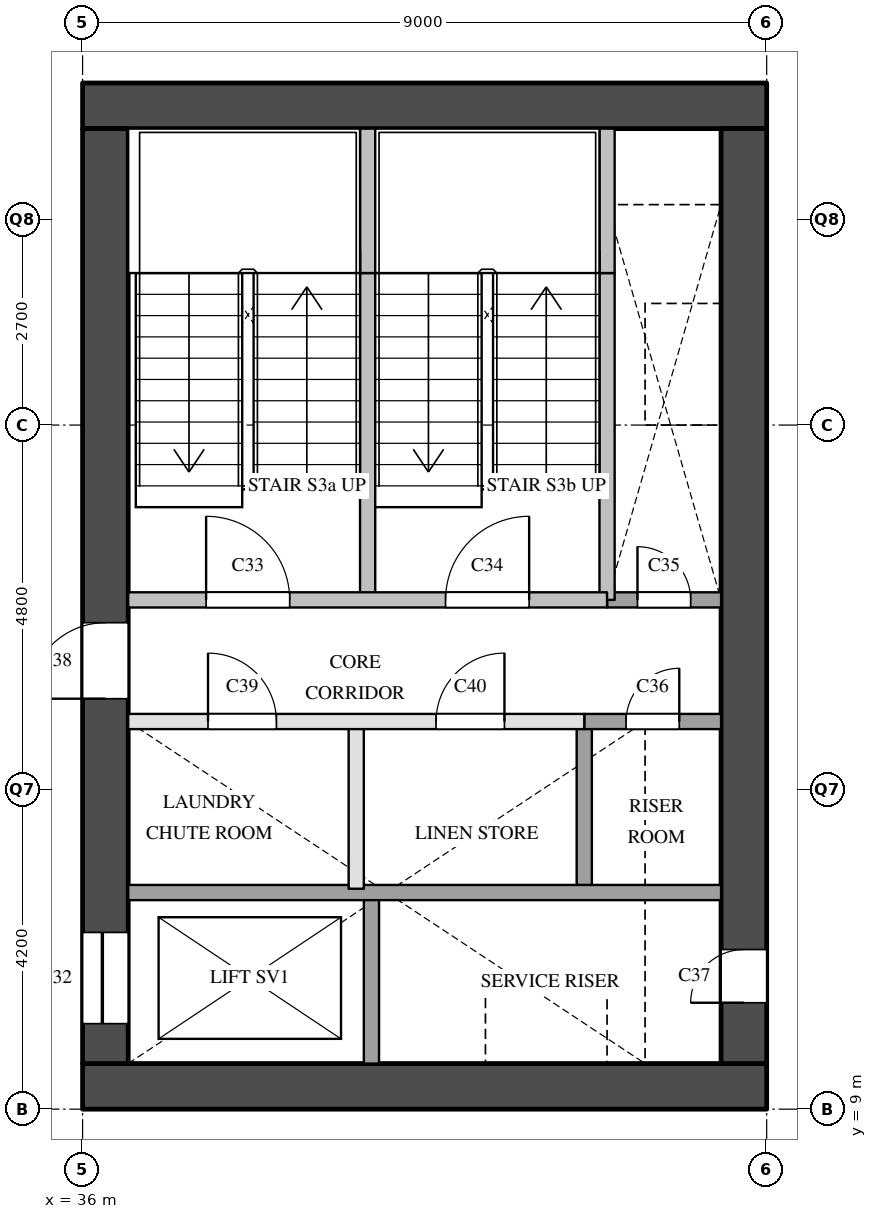
"""IFC4 building model, lengths in metres.
Left out: names, types, materials, properties, quantities, classifications, styles, units other than length and angle.
Written with IfcOpenShell. Run it as: python <this file> out.ifc"""

import sys

from ifc_helpers import new_model, si_unit, direction, frame, frame_2d, origin, place, context, subcontext, project, spatial, rectangle, extrude, element, fill, save


model = new_model("IFC4")
c1 = context("Model", 3, precision=1e-05, world=origin(), true_north=direction((0.0, 1.0)))
c2 = subcontext(c1, "Body", "Model", "MODEL_VIEW")
j1 = project(units=[si_unit("LENGTHUNIT", "METRE"), si_unit("PLANEANGLEUNIT", "RADIAN")], contexts=[c1])
p1 = place(None, origin())
s1 = spatial("IfcSite", under=j1, at=p1, CompositionType="ELEMENT")
p2 = place(p1, origin())
s2 = spatial("IfcBuilding", under=s1, at=p2, CompositionType="ELEMENT")
p3 = place(p2, frame((0.0, 0.0, 65.2)))
s3 = spatial("IfcBuildingStorey", under=s2, at=p3, CompositionType="ELEMENT", Elevation=65.2)
for number, where, z_axis, x_axis in (
    (1, (36.0, 9.3, 0.0), (0.0, 0.0, 1.0), (1.0, 0.0, 0.0)),
    (2, (36.0, 22.2, 0.0), (0.0, 0.0, 1.0), (1.0, 0.0, 0.0)),
):
    element("IfcWall", number, at=place(p3, frame(where, z_axis=z_axis, x_axis=x_axis)), inside=s3, PredefinedType="SHEAR", context=c2, shape_type="SweptSolid", body=[
        extrude(rectangle(XDim=9.0, YDim=0.6, at=frame_2d((4.5, 0.0))), origin(), (0.0, 0.0, 1.0), 3.5),
    ])
p4 = place(p3, frame((36.3, 9.6, 0.0), z_axis=(0.0, 0.0, 1.0), x_axis=(0.0, 1.0, 0.0)))
e3 = element("IfcWall", 3, at=p4, inside=s3, PredefinedType="SHEAR", context=c2, shape_type="SweptSolid", body=[
    extrude(rectangle(XDim=12.3, YDim=0.6, at=frame_2d((6.15, 0.0))), origin(), (0.0, 0.0, 1.0), 3.5),
])
p5 = place(p4, frame((0.525, 0.0, 0.0)))
e4 = element("IfcOpeningElement", 4, at=p5, cuts=e3, PredefinedType="OPENING", context=c2, shape_type="SweptSolid", body=[
    extrude(rectangle(XDim=1.2, YDim=2.1, at=frame_2d((0.6, 1.05))), frame((0.0, 0.31, 0.0), z_axis=(0.0, -1.0, 0.0), x_axis=(1.0, 0.0, 0.0)), (0.0, 0.0, 1.0), 0.62),
])
p6 = place(p4, frame((4.8, 0.0, 0.0)))
e5 = element("IfcOpeningElement", 5, at=p6, cuts=e3, PredefinedType="OPENING", context=c2, shape_type="SweptSolid", body=[
    extrude(rectangle(XDim=1.0, YDim=2.1, at=frame_2d((0.5, 1.05))), frame((0.0, 0.31, 0.0), z_axis=(0.0, -1.0, 0.0), x_axis=(1.0, 0.0, 0.0)), (0.0, 0.0, 1.0), 0.62),
])
p7 = place(p3, frame((44.7, 9.6, 0.0), z_axis=(0.0, 0.0, 1.0), x_axis=(0.0, 1.0, 0.0)))
e6 = element("IfcWall", 6, at=p7, inside=s3, PredefinedType="SHEAR", context=c2, shape_type="SweptSolid", body=[
    extrude(rectangle(XDim=12.3, YDim=0.6, at=frame_2d((6.15, 0.0))), origin(), (0.0, 0.0, 1.0), 3.5),
])
p8 = place(p7, frame((0.8, 0.0, 0.0)))
e7 = element("IfcOpeningElement", 7, at=p8, cuts=e6, PredefinedType="OPENING", context=c2, shape_type="SweptSolid", body=[
    extrude(rectangle(XDim=0.7, YDim=2.1, at=frame_2d((0.35, 1.05))), frame((0.0, 0.31, 0.0), z_axis=(0.0, -1.0, 0.0), x_axis=(1.0, 0.0, 0.0)), (0.0, 0.0, 1.0), 0.62),
])
p9 = place(p3, frame((39.6, 11.9, 0.0), z_axis=(0.0, 0.0, 1.0), x_axis=(0.0, 1.0, 0.0)))
e8 = element("IfcWall", 8, at=p9, inside=s3, PredefinedType="PARTITIONING", context=c2, shape_type="SweptSolid", body=[
    extrude(rectangle(XDim=2.2, YDim=0.2, at=frame_2d((1.1, 0.0))), origin(), (0.0, 0.0, 1.0), 3.5),
])
p10 = place(p3, frame((39.75, 15.7, 0.0), z_axis=(0.0, 0.0, 1.0), x_axis=(0.0, 1.0, 0.0)))
e9 = element("IfcWall", 9, at=p10, inside=s3, PredefinedType="SOLIDWALL", context=c2, shape_type="SweptSolid", body=[
    extrude(rectangle(XDim=4.3, YDim=0.2, at=frame_2d((2.15, 0.0))), origin(), (0.0, 0.0, 1.0), 3.5),
])
p11 = place(p3, frame((39.75, 20.0, 0.0), z_axis=(0.0, 0.0, 1.0), x_axis=(0.0, 1.0, 0.0)))
e10 = element("IfcWall", 10, at=p11, inside=s3, PredefinedType="SOLIDWALL", context=c2, shape_type="SweptSolid", body=[
    extrude(rectangle(XDim=1.9, YDim=0.2, at=frame_2d((0.95, 0.0))), origin(), (0.0, 0.0, 1.0), 3.5),
])
p12 = place(p3, frame((39.8, 9.6, 0.0), z_axis=(0.0, 0.0, 1.0), x_axis=(0.0, 1.0, 0.0)))
e11 = element("IfcWall", 11, at=p12, inside=s3, PredefinedType="SOLIDWALL", context=c2, shape_type="SweptSolid", body=[
    extrude(rectangle(XDim=2.3, YDim=0.2, at=frame_2d((1.15, 0.0))), origin(), (0.0, 0.0, 1.0), 3.5),
])
p13 = place(p3, frame((42.6, 11.9, 0.0), z_axis=(0.0, 0.0, 1.0), x_axis=(0.0, 1.0, 0.0)))
e12 = element("IfcWall", 12, at=p13, inside=s3, PredefinedType="SOLIDWALL", context=c2, shape_type="SweptSolid", body=[
    extrude(rectangle(XDim=2.2, YDim=0.2, at=frame_2d((1.1, 0.0))), origin(), (0.0, 0.0, 1.0), 3.5),
])
p14 = place(p3, frame((42.9, 15.7, 0.0), z_axis=(0.0, 0.0, 1.0), x_axis=(0.0, 1.0, 0.0)))
e13 = element("IfcWall", 13, at=p14, inside=s3, PredefinedType="SOLIDWALL", context=c2, shape_type="SweptSolid", body=[
    extrude(rectangle(XDim=4.3, YDim=0.2, at=frame_2d((2.15, 0.0))), origin(), (0.0, 0.0, 1.0), 3.5),
])
p15 = place(p3, frame((42.9, 20.0, 0.0), z_axis=(0.0, 0.0, 1.0), x_axis=(0.0, 1.0, 0.0)))
e14 = element("IfcWall", 14, at=p15, inside=s3, PredefinedType="SOLIDWALL", context=c2, shape_type="SweptSolid", body=[
    extrude(rectangle(XDim=1.9, YDim=0.2, at=frame_2d((0.95, 0.0))), origin(), (0.0, 0.0, 1.0), 3.5),
])
p16 = place(p3, frame((36.6, 11.85, 0.0), z_axis=(0.0, 0.0, 1.0), x_axis=(1.0, 0.0, 0.0)))
e15 = element("IfcWall", 15, at=p16, inside=s3, PredefinedType="SOLIDWALL", context=c2, shape_type="SweptSolid", body=[
    extrude(rectangle(XDim=7.8, YDim=0.2, at=frame_2d((3.9, 0.0))), origin(), (0.0, 0.0, 1.0), 3.5),
])
p17 = place(p3, frame((36.6, 14.1, 0.0), z_axis=(0.0, 0.0, 1.0), x_axis=(1.0, 0.0, 0.0)))
e16 = element("IfcWall", 16, at=p17, inside=s3, PredefinedType="PARTITIONING", context=c2, shape_type="SweptSolid", body=[
    extrude(rectangle(XDim=6.0, YDim=0.2, at=frame_2d((3.0, 0.0))), origin(), (0.0, 0.0, 1.0), 3.5),
])
p18 = place(p17, frame((1.05, 0.0, 0.0)))
e17 = element("IfcOpeningElement", 17, at=p18, cuts=e16, PredefinedType="OPENING", context=c2, shape_type="SweptSolid", body=[
    extrude(rectangle(XDim=0.9, YDim=2.1, at=frame_2d((0.45, 1.05))), frame((0.0, 0.11, 0.0), z_axis=(0.0, -1.0, 0.0), x_axis=(1.0, 0.0, 0.0)), (0.0, 0.0, 1.0), 0.22),
])
p19 = place(p17, frame((4.05, 0.0, 0.0)))
e18 = element("IfcOpeningElement", 18, at=p19, cuts=e16, PredefinedType="OPENING", context=c2, shape_type="SweptSolid", body=[
    extrude(rectangle(XDim=0.9, YDim=2.1, at=frame_2d((0.45, 1.05))), frame((0.0, 0.11, 0.0), z_axis=(0.0, -1.0, 0.0), x_axis=(1.0, 0.0, 0.0)), (0.0, 0.0, 1.0), 0.22),
])
p20 = place(p3, frame((42.6, 14.1, 0.0), z_axis=(0.0, 0.0, 1.0), x_axis=(1.0, 0.0, 0.0)))
e19 = element("IfcWall", 19, at=p20, inside=s3, PredefinedType="SOLIDWALL", context=c2, shape_type="SweptSolid", body=[
    extrude(rectangle(XDim=1.8, YDim=0.2, at=frame_2d((0.9, 0.0))), origin(), (0.0, 0.0, 1.0), 3.5),
])
p21 = place(p20, frame((0.55, 0.0, 0.0)))
e20 = element("IfcOpeningElement", 20, at=p21, cuts=e19, PredefinedType="OPENING", context=c2, shape_type="SweptSolid", body=[
    extrude(rectangle(XDim=0.7, YDim=2.1, at=frame_2d((0.35, 1.05))), frame((0.0, 0.11, 0.0), z_axis=(0.0, -1.0, 0.0), x_axis=(1.0, 0.0, 0.0)), (0.0, 0.0, 1.0), 0.22),
])
p22 = place(p3, frame((42.9, 15.7, 0.0), z_axis=(0.0, 0.0, 1.0), x_axis=(1.0, 0.0, 0.0)))
e21 = element("IfcWall", 21, at=p22, inside=s3, PredefinedType="SOLIDWALL", context=c2, shape_type="SweptSolid", body=[
    extrude(rectangle(XDim=1.5, YDim=0.2, at=frame_2d((0.75, 0.0))), origin(), (0.0, 0.0, 1.0), 3.5),
])
p23 = place(p22, frame((0.4, 0.0, 0.0)))
e22 = element("IfcOpeningElement", 22, at=p23, cuts=e21, PredefinedType="OPENING", context=c2, shape_type="SweptSolid", body=[
    extrude(rectangle(XDim=0.7, YDim=2.1, at=frame_2d((0.35, 1.05))), frame((0.0, 0.11, 0.0), z_axis=(0.0, -1.0, 0.0), x_axis=(1.0, 0.0, 0.0)), (0.0, 0.0, 1.0), 0.22),
])
p24 = place(p3, frame((36.6, 15.7, 0.0), z_axis=(0.0, 0.0, 1.0), x_axis=(1.0, 0.0, 0.0)))
e23 = element("IfcWall", 23, at=p24, inside=s3, PredefinedType="SOLIDWALL", context=c2, shape_type="SweptSolid", body=[
    extrude(rectangle(XDim=6.3, YDim=0.2, at=frame_2d((3.15, 0.0))), origin(), (0.0, 0.0, 1.0), 3.5),
])
p25 = place(p24, frame((1.025, 0.0, 0.0)))
e24 = element("IfcOpeningElement", 24, at=p25, cuts=e23, PredefinedType="OPENING", context=c2, shape_type="SweptSolid", body=[
    extrude(rectangle(XDim=1.1, YDim=2.1, at=frame_2d((0.55, 1.05))), frame((0.0, 0.11, 0.0), z_axis=(0.0, -1.0, 0.0), x_axis=(1.0, 0.0, 0.0)), (0.0, 0.0, 1.0), 0.22),
])
p26 = place(p24, frame((4.175, 0.0, 0.0)))
e25 = element("IfcOpeningElement", 25, at=p26, cuts=e23, PredefinedType="OPENING", context=c2, shape_type="SweptSolid", body=[
    extrude(rectangle(XDim=1.1, YDim=2.1, at=frame_2d((0.55, 1.05))), frame((0.0, 0.11, 0.0), z_axis=(0.0, -1.0, 0.0), x_axis=(1.0, 0.0, 0.0)), (0.0, 0.0, 1.0), 0.22),
])
p27 = place(p5, origin())
e26 = element("IfcDoor", 26, at=p27, inside=s3, OperationType="SLIDING_TO_LEFT", PredefinedType="DOOR", context=c2, shape_type="SweptSolid", body=[
    extrude(rectangle(XDim=1.2, YDim=2.1, at=frame_2d((0.6, 1.05))), frame((0.0, 0.025, 0.0), z_axis=(0.0, -1.0, 0.0), x_axis=(1.0, 0.0, 0.0)), (0.0, 0.0, 1.0), 0.05),
])
fill(e4, e26)
p28 = place(p25, origin())
e27 = element("IfcDoor", 27, at=p28, inside=s3, OperationType="SINGLE_SWING_LEFT", PredefinedType="DOOR", context=c2, shape_type="SweptSolid", body=[
    extrude(rectangle(XDim=1.1, YDim=2.1, at=frame_2d((0.55, 1.05))), frame((0.0, 0.025, 0.0), z_axis=(0.0, -1.0, 0.0), x_axis=(1.0, 0.0, 0.0)), (0.0, 0.0, 1.0), 0.05),
])
fill(e24, e27)
p29 = place(p26, origin())
e28 = element("IfcDoor", 28, at=p29, inside=s3, OperationType="SINGLE_SWING_RIGHT", PredefinedType="DOOR", context=c2, shape_type="SweptSolid", body=[
    extrude(rectangle(XDim=1.1, YDim=2.1, at=frame_2d((0.55, 1.05))), frame((0.0, 0.025, 0.0), z_axis=(0.0, -1.0, 0.0), x_axis=(1.0, 0.0, 0.0)), (0.0, 0.0, 1.0), 0.05),
])
fill(e25, e28)
p30 = place(p23, origin())
e29 = element("IfcDoor", 29, at=p30, inside=s3, OperationType="SINGLE_SWING_LEFT", PredefinedType="DOOR", context=c2, shape_type="SweptSolid", body=[
    extrude(rectangle(XDim=0.7, YDim=2.1, at=frame_2d((0.35, 1.05))), frame((0.0, 0.025, 0.0), z_axis=(0.0, -1.0, 0.0), x_axis=(1.0, 0.0, 0.0)), (0.0, 0.0, 1.0), 0.05),
])
fill(e22, e29)
p31 = place(p21, origin())
e30 = element("IfcDoor", 30, at=p31, inside=s3, OperationType="SINGLE_SWING_RIGHT", PredefinedType="DOOR", context=c2, shape_type="SweptSolid", body=[
    extrude(rectangle(XDim=0.7, YDim=2.1, at=frame_2d((0.35, 1.05))), frame((0.0, 0.025, 0.0), z_axis=(0.0, -1.0, 0.0), x_axis=(1.0, 0.0, 0.0)), (0.0, 0.0, 1.0), 0.05),
])
fill(e20, e30)
p32 = place(p8, origin())
e31 = element("IfcDoor", 31, at=p32, inside=s3, OperationType="SINGLE_SWING_LEFT", PredefinedType="DOOR", context=c2, shape_type="SweptSolid", body=[
    extrude(rectangle(XDim=0.7, YDim=2.1, at=frame_2d((0.35, 1.05))), frame((0.0, 0.025, 0.0), z_axis=(0.0, -1.0, 0.0), x_axis=(1.0, 0.0, 0.0)), (0.0, 0.0, 1.0), 0.05),
])
fill(e7, e31)
p33 = place(p6, origin())
e32 = element("IfcDoor", 32, at=p33, inside=s3, OperationType="SINGLE_SWING_LEFT", PredefinedType="DOOR", context=c2, shape_type="SweptSolid", body=[
    extrude(rectangle(XDim=1.0, YDim=2.1, at=frame_2d((0.5, 1.05))), frame((0.0, 0.025, 0.0), z_axis=(0.0, -1.0, 0.0), x_axis=(1.0, 0.0, 0.0)), (0.0, 0.0, 1.0), 0.05),
])
fill(e5, e32)
p34 = place(p18, origin())
e33 = element("IfcDoor", 33, at=p34, inside=s3, OperationType="SINGLE_SWING_LEFT", PredefinedType="DOOR", context=c2, shape_type="SweptSolid", body=[
    extrude(rectangle(XDim=0.9, YDim=2.1, at=frame_2d((0.45, 1.05))), frame((0.0, 0.025, 0.0), z_axis=(0.0, -1.0, 0.0), x_axis=(1.0, 0.0, 0.0)), (0.0, 0.0, 1.0), 0.05),
])
fill(e17, e33)
p35 = place(p19, origin())
e34 = element("IfcDoor", 34, at=p35, inside=s3, OperationType="SINGLE_SWING_RIGHT", PredefinedType="DOOR", context=c2, shape_type="SweptSolid", body=[
    extrude(rectangle(XDim=0.9, YDim=2.1, at=frame_2d((0.45, 1.05))), frame((0.0, 0.025, 0.0), z_axis=(0.0, -1.0, 0.0), x_axis=(1.0, 0.0, 0.0)), (0.0, 0.0, 1.0), 0.05),
])
fill(e18, e34)
save(model, sys.argv[1])
